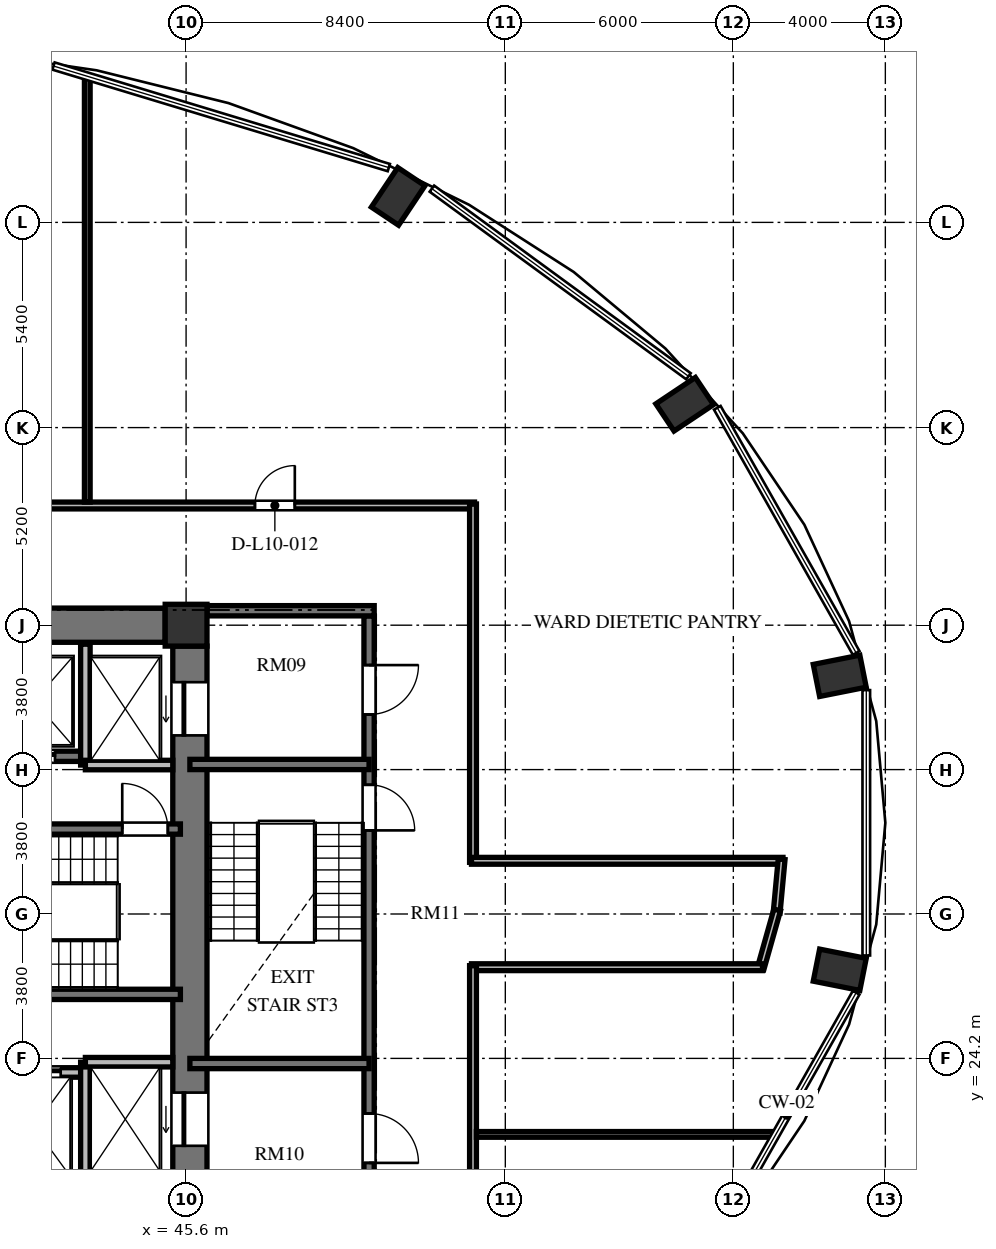
"""IFC4 building model, lengths in metres.
Left out: names, types, materials, properties, quantities, classifications, styles, units other than length and angle.
Written with IfcOpenShell. Run it as: python <this file> out.ifc"""

import sys

from ifc_helpers import new_model, si_unit, direction, frame, frame_2d, origin, origin_2d, place, context, subcontext, project, spatial, rectangle, extrude, element, fill, save


model = new_model("IFC4")
c1 = context("Model", 3, precision=1e-05, world=origin(), true_north=direction((0.0, 1.0)))
c2 = subcontext(c1, "Body", "Model", "MODEL_VIEW")
j1 = project(units=[si_unit("LENGTHUNIT", "METRE"), si_unit("PLANEANGLEUNIT", "RADIAN")], contexts=[c1])
p1 = place(None, origin())
s1 = spatial("IfcSite", under=j1, at=p1, CompositionType="ELEMENT")
p2 = place(p1, origin())
s2 = spatial("IfcBuilding", under=s1, at=p2, CompositionType="ELEMENT")
p3 = place(p2, frame((0.0, 0.0, 43.44)))
s3 = spatial("IfcBuildingStorey", under=s2, at=p3, CompositionType="ELEMENT", Elevation=43.44)
for number, where, z_axis, x_axis in (
    (1, (62.8, 26.532, 0.0), (0.0, 0.0, 1.0), (0.981, -0.195, 0.0)),
    (2, (62.8, 34.268, 0.0), (0.0, 0.0, 1.0), (0.981, 0.195, 0.0)),
    (3, (58.72, 41.414, 0.0), (0.0, 0.0, 1.0), (0.831, 0.556, 0.0)),
    (4, (51.181, 46.884, 0.0), (0.0, 0.0, 1.0), (0.556, 0.831, 0.0)),
):
    element("IfcColumn", number, at=place(p3, frame(where, z_axis=z_axis, x_axis=x_axis)), inside=s3, PredefinedType="COLUMN", context=c2, shape_type="SweptSolid", body=[
        extrude(rectangle(XDim=1.25, YDim=0.86, at=origin_2d()), origin(), (0.0, 0.0, 1.0), 3.648),
    ])
p4 = place(p3, frame((45.6, 35.6, 0.0), z_axis=(0.0, 0.0, 1.0), x_axis=(1.0, 0.0, 0.0)))
e5 = element("IfcColumn", 5, at=p4, inside=s3, PredefinedType="COLUMN", context=c2, shape_type="SweptSolid", body=[
    extrude(rectangle(XDim=1.1, YDim=1.1, at=origin_2d()), origin(), (0.0, 0.0, 1.0), 3.648),
])
p5 = place(p3, frame((45.7, 20.95, 0.0), z_axis=(0.0, 0.0, 1.0), x_axis=(0.0, 1.0, 0.0)))
e6 = element("IfcWall", 6, at=p5, inside=s3, PredefinedType="SHEAR", context=c2, shape_type="SweptSolid", body=[
    extrude(rectangle(XDim=14.1, YDim=0.9, at=frame_2d((7.05, 0.0))), origin(), (0.0, 0.0, 1.0), 3.648),
])
p6 = place(p5, frame((11.75, 0.0, 0.0)))
e7 = element("IfcOpeningElement", 7, at=p6, cuts=e6, PredefinedType="OPENING", context=c2, shape_type="SweptSolid", body=[
    extrude(rectangle(XDim=1.4, YDim=2.3, at=frame_2d((0.7, 1.15))), frame((0.0, 0.46, 0.0), z_axis=(0.0, -1.0, 0.0), x_axis=(1.0, 0.0, 0.0)), (0.0, 0.0, 1.0), 0.92),
])
p7 = place(p5, frame((0.95, 0.0, 0.0)))
e8 = element("IfcOpeningElement", 8, at=p7, cuts=e6, PredefinedType="OPENING", context=c2, shape_type="SweptSolid", body=[
    extrude(rectangle(XDim=1.4, YDim=2.3, at=frame_2d((0.7, 1.15))), frame((0.0, 0.46, 0.0), z_axis=(0.0, -1.0, 0.0), x_axis=(1.0, 0.0, 0.0)), (0.0, 0.0, 1.0), 0.92),
])
p8 = place(p3, frame((39.75, 35.6, 0.0), z_axis=(0.0, 0.0, 1.0), x_axis=(1.0, 0.0, 0.0)))
e9 = element("IfcWall", 9, at=p8, inside=s3, PredefinedType="SHEAR", context=c2, shape_type="SweptSolid", body=[
    extrude(rectangle(XDim=5.3, YDim=0.9, at=frame_2d((2.65, 0.0))), origin(), (0.0, 0.0, 1.0), 3.648),
])
p9 = place(p3, frame((37.465, 30.235, 0.0), z_axis=(0.0, 0.0, 1.0), x_axis=(1.0, 0.0, 0.0)))
e10 = element("IfcWall", 10, at=p9, inside=s3, PredefinedType="SHEAR", context=c2, shape_type="SweptSolid", body=[
    extrude(rectangle(XDim=7.985, YDim=0.27, at=frame_2d((3.992, 0.0))), origin(), (0.0, 0.0, 1.0), 3.648),
])
p10 = place(p9, frame((6.455, 0.0, 0.0)))
e11 = element("IfcOpeningElement", 11, at=p10, cuts=e10, PredefinedType="OPENING", context=c2, shape_type="SweptSolid", body=[
    extrude(rectangle(XDim=1.2, YDim=2.15, at=frame_2d((0.6, 1.075))), frame((0.0, 0.145, 0.0), z_axis=(0.0, -1.0, 0.0), x_axis=(1.0, 0.0, 0.0)), (0.0, 0.0, 1.0), 0.29),
])
p11 = place(p3, frame((37.465, 25.885, 0.0), z_axis=(0.0, 0.0, 1.0), x_axis=(1.0, 0.0, 0.0)))
e12 = element("IfcWall", 12, at=p11, inside=s3, PredefinedType="SHEAR", context=c2, shape_type="SweptSolid", body=[
    extrude(rectangle(XDim=7.985, YDim=0.27, at=frame_2d((3.992, 0.0))), origin(), (0.0, 0.0, 1.0), 3.648),
])
p12 = place(p3, frame((26.55, 32.15, 0.0), z_axis=(0.0, 0.0, 1.0), x_axis=(1.0, 0.0, 0.0)))
e13 = element("IfcWall", 13, at=p12, inside=s3, PredefinedType="SHEAR", context=c2, shape_type="SweptSolid", body=[
    extrude(rectangle(XDim=16.4, YDim=0.27, at=frame_2d((8.2, 0.0))), origin(), (0.0, 0.0, 1.0), 3.648),
])
p13 = place(p12, frame((1.1, 0.0, 0.0)))
e14 = element("IfcOpeningElement", 14, at=p13, cuts=e13, PredefinedType="OPENING", context=c2, shape_type="SweptSolid", body=[
    extrude(rectangle(XDim=1.1, YDim=2.2, at=frame_2d((0.55, 1.1))), frame((0.0, 0.145, 0.0), z_axis=(0.0, -1.0, 0.0), x_axis=(1.0, 0.0, 0.0)), (0.0, 0.0, 1.0), 0.29),
])
p14 = place(p12, frame((3.7, 0.0, 0.0)))
e15 = element("IfcOpeningElement", 15, at=p14, cuts=e13, PredefinedType="OPENING", context=c2, shape_type="SweptSolid", body=[
    extrude(rectangle(XDim=1.1, YDim=2.2, at=frame_2d((0.55, 1.1))), frame((0.0, 0.145, 0.0), z_axis=(0.0, -1.0, 0.0), x_axis=(1.0, 0.0, 0.0)), (0.0, 0.0, 1.0), 0.29),
])
p15 = place(p12, frame((6.5, 0.0, 0.0)))
e16 = element("IfcOpeningElement", 16, at=p15, cuts=e13, PredefinedType="OPENING", context=c2, shape_type="SweptSolid", body=[
    extrude(rectangle(XDim=1.1, YDim=2.2, at=frame_2d((0.55, 1.1))), frame((0.0, 0.145, 0.0), z_axis=(0.0, -1.0, 0.0), x_axis=(1.0, 0.0, 0.0)), (0.0, 0.0, 1.0), 0.29),
])
p16 = place(p12, frame((9.1, 0.0, 0.0)))
e17 = element("IfcOpeningElement", 17, at=p16, cuts=e13, PredefinedType="OPENING", context=c2, shape_type="SweptSolid", body=[
    extrude(rectangle(XDim=1.1, YDim=2.2, at=frame_2d((0.55, 1.1))), frame((0.0, 0.145, 0.0), z_axis=(0.0, -1.0, 0.0), x_axis=(1.0, 0.0, 0.0)), (0.0, 0.0, 1.0), 0.29),
])
p17 = place(p12, frame((11.9, 0.0, 0.0)))
e18 = element("IfcOpeningElement", 18, at=p17, cuts=e13, PredefinedType="OPENING", context=c2, shape_type="SweptSolid", body=[
    extrude(rectangle(XDim=1.1, YDim=2.2, at=frame_2d((0.55, 1.1))), frame((0.0, 0.145, 0.0), z_axis=(0.0, -1.0, 0.0), x_axis=(1.0, 0.0, 0.0)), (0.0, 0.0, 1.0), 0.29),
])
p18 = place(p12, frame((14.5, 0.0, 0.0)))
e19 = element("IfcOpeningElement", 19, at=p18, cuts=e13, PredefinedType="OPENING", context=c2, shape_type="SweptSolid", body=[
    extrude(rectangle(XDim=1.1, YDim=2.2, at=frame_2d((0.55, 1.1))), frame((0.0, 0.145, 0.0), z_axis=(0.0, -1.0, 0.0), x_axis=(1.0, 0.0, 0.0)), (0.0, 0.0, 1.0), 0.29),
])
p19 = place(p3, frame((26.75, 23.83, 0.0), z_axis=(0.0, 0.0, 1.0), x_axis=(1.0, 0.0, 0.0)))
e20 = element("IfcWall", 20, at=p19, inside=s3, PredefinedType="SOLIDWALL", context=c2, shape_type="SweptSolid", body=[
    extrude(rectangle(XDim=16.2, YDim=0.25, at=frame_2d((8.1, 0.0))), origin(), (0.0, 0.0, 1.0), 3.428),
])
p20 = place(p19, frame((0.9, 0.0, 0.0)))
e21 = element("IfcOpeningElement", 21, at=p20, cuts=e20, PredefinedType="OPENING", context=c2, shape_type="SweptSolid", body=[
    extrude(rectangle(XDim=1.1, YDim=2.2, at=frame_2d((0.55, 1.1))), frame((0.0, 0.135, 0.0), z_axis=(0.0, -1.0, 0.0), x_axis=(1.0, 0.0, 0.0)), (0.0, 0.0, 1.0), 0.27),
])
p21 = place(p19, frame((3.5, 0.0, 0.0)))
e22 = element("IfcOpeningElement", 22, at=p21, cuts=e20, PredefinedType="OPENING", context=c2, shape_type="SweptSolid", body=[
    extrude(rectangle(XDim=1.1, YDim=2.2, at=frame_2d((0.55, 1.1))), frame((0.0, 0.135, 0.0), z_axis=(0.0, -1.0, 0.0), x_axis=(1.0, 0.0, 0.0)), (0.0, 0.0, 1.0), 0.27),
])
p22 = place(p19, frame((6.3, 0.0, 0.0)))
e23 = element("IfcOpeningElement", 23, at=p22, cuts=e20, PredefinedType="OPENING", context=c2, shape_type="SweptSolid", body=[
    extrude(rectangle(XDim=1.1, YDim=2.2, at=frame_2d((0.55, 1.1))), frame((0.0, 0.135, 0.0), z_axis=(0.0, -1.0, 0.0), x_axis=(1.0, 0.0, 0.0)), (0.0, 0.0, 1.0), 0.27),
])
p23 = place(p19, frame((8.9, 0.0, 0.0)))
e24 = element("IfcOpeningElement", 24, at=p23, cuts=e20, PredefinedType="OPENING", context=c2, shape_type="SweptSolid", body=[
    extrude(rectangle(XDim=1.1, YDim=2.2, at=frame_2d((0.55, 1.1))), frame((0.0, 0.135, 0.0), z_axis=(0.0, -1.0, 0.0), x_axis=(1.0, 0.0, 0.0)), (0.0, 0.0, 1.0), 0.27),
])
p24 = place(p19, frame((11.7, 0.0, 0.0)))
e25 = element("IfcOpeningElement", 25, at=p24, cuts=e20, PredefinedType="OPENING", context=c2, shape_type="SweptSolid", body=[
    extrude(rectangle(XDim=1.1, YDim=2.2, at=frame_2d((0.55, 1.1))), frame((0.0, 0.135, 0.0), z_axis=(0.0, -1.0, 0.0), x_axis=(1.0, 0.0, 0.0)), (0.0, 0.0, 1.0), 0.27),
])
p25 = place(p19, frame((14.15, 0.0, 0.0)))
e26 = element("IfcOpeningElement", 26, at=p25, cuts=e20, PredefinedType="OPENING", context=c2, shape_type="SweptSolid", body=[
    extrude(rectangle(XDim=1.4, YDim=2.3, at=frame_2d((0.7, 1.15))), frame((0.0, 0.135, 0.0), z_axis=(0.0, -1.0, 0.0), x_axis=(1.0, 0.0, 0.0)), (0.0, 0.0, 1.0), 0.27),
])
p26 = place(p3, frame((42.95, 31.92, 0.0), z_axis=(0.0, 0.0, 1.0), x_axis=(0.0, 1.0, 0.0)))
e27 = element("IfcWall", 27, at=p26, inside=s3, PredefinedType="SOLIDWALL", context=c2, shape_type="SweptSolid", body=[
    extrude(rectangle(XDim=3.18, YDim=0.25, at=frame_2d((1.59, 0.0))), origin(), (0.0, 0.0, 1.0), 3.428),
])
p27 = place(p3, frame((42.95, 31.92, 0.0), z_axis=(0.0, 0.0, 1.0), x_axis=(1.0, 0.0, 0.0)))
e28 = element("IfcWall", 28, at=p27, inside=s3, PredefinedType="SOLIDWALL", context=c2, shape_type="SweptSolid", body=[
    extrude(rectangle(XDim=2.3, YDim=0.25, at=frame_2d((1.15, 0.0))), origin(), (0.0, 0.0, 1.0), 3.428),
])
p28 = place(p3, frame((42.95, 20.9, 0.0), z_axis=(0.0, 0.0, 1.0), x_axis=(0.0, 1.0, 0.0)))
e29 = element("IfcWall", 29, at=p28, inside=s3, PredefinedType="SOLIDWALL", context=c2, shape_type="SweptSolid", body=[
    extrude(rectangle(XDim=3.2, YDim=0.25, at=frame_2d((1.6, 0.0))), origin(), (0.0, 0.0, 1.0), 3.428),
])
p29 = place(p3, frame((42.95, 24.1, 0.0), z_axis=(0.0, 0.0, 1.0), x_axis=(1.0, 0.0, 0.0)))
e30 = element("IfcWall", 30, at=p29, inside=s3, PredefinedType="SOLIDWALL", context=c2, shape_type="SweptSolid", body=[
    extrude(rectangle(XDim=2.3, YDim=0.25, at=frame_2d((1.15, 0.0))), origin(), (0.0, 0.0, 1.0), 3.428),
])
p30 = place(p3, frame((50.415, 35.845, 0.0), z_axis=(0.0, 0.0, 1.0), x_axis=(0.0, -1.0, 0.0)))
e31 = element("IfcWall", 31, at=p30, inside=s3, PredefinedType="SHEAR", context=c2, shape_type="SweptSolid", body=[
    extrude(rectangle(XDim=15.825, YDim=0.27, at=frame_2d((7.913, 0.0))), origin(), (0.0, 0.0, 1.0), 3.648),
])
p31 = place(p30, frame((4.445, 0.0, 0.0)))
e32 = element("IfcOpeningElement", 32, at=p31, cuts=e31, PredefinedType="OPENING", context=c2, shape_type="SweptSolid", body=[
    extrude(rectangle(XDim=1.2, YDim=2.15, at=frame_2d((0.6, 1.075))), frame((0.0, 0.145, 0.0), z_axis=(0.0, -1.0, 0.0), x_axis=(1.0, 0.0, 0.0)), (0.0, 0.0, 1.0), 0.29),
])
p32 = place(p30, frame((1.295, 0.0, 0.0)))
e33 = element("IfcOpeningElement", 33, at=p32, cuts=e31, PredefinedType="OPENING", context=c2, shape_type="SweptSolid", body=[
    extrude(rectangle(XDim=1.3, YDim=2.2, at=frame_2d((0.65, 1.1))), frame((0.0, 0.145, 0.0), z_axis=(0.0, -1.0, 0.0), x_axis=(1.0, 0.0, 0.0)), (0.0, 0.0, 1.0), 0.29),
])
p33 = place(p30, frame((13.095, 0.0, 0.0)))
e34 = element("IfcOpeningElement", 34, at=p33, cuts=e31, PredefinedType="OPENING", context=c2, shape_type="SweptSolid", body=[
    extrude(rectangle(XDim=1.3, YDim=2.2, at=frame_2d((0.65, 1.1))), frame((0.0, 0.145, 0.0), z_axis=(0.0, -1.0, 0.0), x_axis=(1.0, 0.0, 0.0)), (0.0, 0.0, 1.0), 0.29),
])
p34 = place(p3, frame((46.15, 35.98, 0.0), z_axis=(0.0, 0.0, 1.0), x_axis=(1.0, 0.0, 0.0)))
e35 = element("IfcWall", 35, at=p34, inside=s3, PredefinedType="SHEAR", context=c2, shape_type="SweptSolid", body=[
    extrude(rectangle(XDim=4.4, YDim=0.27, at=frame_2d((2.2, 0.0))), origin(), (0.0, 0.0, 1.0), 3.648),
])
for number, where, z_axis, x_axis in (
    (36, (45.7, 31.935, 0.0), (0.0, 0.0, 1.0), (1.0, 0.0, 0.0)),
    (37, (45.7, 24.065, 0.0), (0.0, 0.0, 1.0), (1.0, 0.0, 0.0)),
):
    element("IfcWall", number, at=place(p3, frame(where, z_axis=z_axis, x_axis=x_axis)), inside=s3, PredefinedType="SHEAR", context=c2, shape_type="SweptSolid", body=[
        extrude(rectangle(XDim=4.715, YDim=0.27, at=frame_2d((2.357, 0.0))), origin(), (0.0, 0.0, 1.0), 3.648),
    ])
p35 = place(p3, frame((23.31, 38.75, 0.0), z_axis=(0.0, 0.0, 1.0), x_axis=(1.0, 0.0, 0.0)))
e38 = element("IfcWall", 38, at=p35, inside=s3, PredefinedType="PARTITIONING", context=c2, shape_type="SweptSolid", body=[
    extrude(rectangle(XDim=29.88, YDim=0.18, at=frame_2d((14.94, 0.0))), origin(), (0.0, 0.0, 1.0), 3.053),
])
p36 = place(p35, frame((24.101, 0.0, 0.0)))
e39 = element("IfcOpeningElement", 39, at=p36, cuts=e38, PredefinedType="OPENING", context=c2, shape_type="SweptSolid", body=[
    extrude(rectangle(XDim=1.05, YDim=2.15, at=frame_2d((0.525, 1.075))), frame((0.0, 0.1, 0.0), z_axis=(0.0, -1.0, 0.0), x_axis=(1.0, 0.0, 0.0)), (0.0, 0.0, 1.0), 0.2),
])
p37 = place(p35, frame((13.165, 0.0, 0.0)))
e40 = element("IfcOpeningElement", 40, at=p37, cuts=e38, PredefinedType="OPENING", context=c2, shape_type="SweptSolid", body=[
    extrude(rectangle(XDim=1.05, YDim=2.15, at=frame_2d((0.525, 1.075))), frame((0.0, 0.1, 0.0), z_axis=(0.0, -1.0, 0.0), x_axis=(1.0, 0.0, 0.0)), (0.0, 0.0, 1.0), 0.2),
])
p38 = place(p35, frame((4.479, 0.0, 0.0)))
e41 = element("IfcOpeningElement", 41, at=p38, cuts=e38, PredefinedType="OPENING", context=c2, shape_type="SweptSolid", body=[
    extrude(rectangle(XDim=1.05, YDim=2.15, at=frame_2d((0.525, 1.075))), frame((0.0, 0.1, 0.0), z_axis=(0.0, -1.0, 0.0), x_axis=(1.0, 0.0, 0.0)), (0.0, 0.0, 1.0), 0.2),
])
p39 = place(p3, frame((53.15, 38.79, 0.0), z_axis=(0.0, 0.0, 1.0), x_axis=(0.0, -1.0, 0.0)))
e42 = element("IfcWall", 42, at=p39, inside=s3, PredefinedType="PARTITIONING", context=c2, shape_type="SweptSolid", body=[
    extrude(rectangle(XDim=9.43, YDim=0.18, at=frame_2d((4.715, 0.0))), origin(), (0.0, 0.0, 1.0), 3.428),
])
p40 = place(p3, frame((53.11, 29.4, 0.0), z_axis=(0.0, 0.0, 1.0), x_axis=(1.0, 0.0, 0.0)))
e43 = element("IfcWall", 43, at=p40, inside=s3, PredefinedType="PARTITIONING", context=c2, shape_type="SweptSolid", body=[
    extrude(rectangle(XDim=8.197, YDim=0.18, at=frame_2d((4.098, 0.0))), origin(), (0.0, 0.0, 1.0), 3.428),
])
p41 = place(p3, frame((61.271, 29.44, 0.0), z_axis=(0.0, 0.0, 1.0), x_axis=(-0.092539930621, -0.995708974169, 0.0)))
e44 = element("IfcWall", 44, at=p41, inside=s3, PredefinedType="PARTITIONING", context=c2, shape_type="SweptSolid", body=[
    extrude(rectangle(XDim=1.417, YDim=0.18, at=frame_2d((0.708, 0.0))), origin(), (0.0, 0.0, 1.0), 3.428),
])
p42 = place(p3, frame((61.154, 28.107, 0.0), z_axis=(0.0, 0.0, 1.0), x_axis=(-0.271748942561, -0.962368179138, 0.0)))
e45 = element("IfcWall", 45, at=p42, inside=s3, PredefinedType="PARTITIONING", context=c2, shape_type="SweptSolid", body=[
    extrude(rectangle(XDim=1.606, YDim=0.18, at=frame_2d((0.803, 0.0))), origin(), (0.0, 0.0, 1.0), 3.428),
])
p43 = place(p3, frame((60.768, 26.6, 0.0), z_axis=(0.0, 0.0, 1.0), x_axis=(-1.0, 0.0, 0.0)))
e46 = element("IfcWall", 46, at=p43, inside=s3, PredefinedType="PARTITIONING", context=c2, shape_type="SweptSolid", body=[
    extrude(rectangle(XDim=7.658, YDim=0.18, at=frame_2d((3.829, 0.0))), origin(), (0.0, 0.0, 1.0), 3.428),
])
p44 = place(p3, frame((53.15, 26.64, 0.0), z_axis=(0.0, 0.0, 1.0), x_axis=(0.0, -1.0, 0.0)))
e47 = element("IfcWall", 47, at=p44, inside=s3, PredefinedType="PARTITIONING", context=c2, shape_type="SweptSolid", body=[
    extrude(rectangle(XDim=6.66, YDim=0.18, at=frame_2d((3.33, 0.0))), origin(), (0.0, 0.0, 1.0), 3.428),
])
p45 = place(p3, frame((53.24, 22.2, 0.0), z_axis=(0.0, 0.0, 1.0), x_axis=(1.0, 0.0, 0.0)))
e48 = element("IfcWall", 48, at=p45, inside=s3, PredefinedType="PARTITIONING", context=c2, shape_type="SweptSolid", body=[
    extrude(rectangle(XDim=7.875, YDim=0.15, at=frame_2d((3.938, 0.0))), origin(), (0.0, 0.0, 1.0), 3.428),
])
p46 = place(p3, frame((43.0, 38.84, 0.0), z_axis=(0.0, 0.0, 1.0), x_axis=(0.0, 1.0, 0.0)))
e49 = element("IfcWall", 49, at=p46, inside=s3, PredefinedType="PARTITIONING", context=c2, shape_type="SweptSolid", body=[
    extrude(rectangle(XDim=11.193, YDim=0.15, at=frame_2d((5.597, 0.0))), origin(), (0.0, 0.0, 1.0), 3.428),
])
p47 = place(p10, origin())
e50 = element("IfcDoor", 50, at=p47, inside=s3, OperationType="SINGLE_SWING_LEFT", PredefinedType="DOOR", context=c2, shape_type="SweptSolid", body=[
    extrude(rectangle(XDim=1.2, YDim=2.15, at=frame_2d((0.6, 1.075))), frame((0.0, 0.025, 0.0), z_axis=(0.0, -1.0, 0.0), x_axis=(1.0, 0.0, 0.0)), (0.0, 0.0, 1.0), 0.05),
])
fill(e11, e50)
p48 = place(p18, origin())
e51 = element("IfcDoor", 51, at=p48, inside=s3, OperationType="SLIDING_TO_LEFT", PredefinedType="DOOR", context=c2, shape_type="SweptSolid", body=[
    extrude(rectangle(XDim=1.1, YDim=2.2, at=frame_2d((0.55, 1.1))), frame((0.0, 0.025, 0.0), z_axis=(0.0, -1.0, 0.0), x_axis=(1.0, 0.0, 0.0)), (0.0, 0.0, 1.0), 0.05),
])
fill(e19, e51)
p49 = place(p6, origin())
e52 = element("IfcDoor", 52, at=p49, inside=s3, OperationType="SLIDING_TO_LEFT", PredefinedType="DOOR", context=c2, shape_type="SweptSolid", body=[
    extrude(rectangle(XDim=1.4, YDim=2.3, at=frame_2d((0.7, 1.15))), frame((0.0, 0.025, 0.0), z_axis=(0.0, -1.0, 0.0), x_axis=(1.0, 0.0, 0.0)), (0.0, 0.0, 1.0), 0.05),
])
fill(e7, e52)
p50 = place(p7, origin())
e53 = element("IfcDoor", 53, at=p50, inside=s3, OperationType="SLIDING_TO_LEFT", PredefinedType="DOOR", context=c2, shape_type="SweptSolid", body=[
    extrude(rectangle(XDim=1.4, YDim=2.3, at=frame_2d((0.7, 1.15))), frame((0.0, 0.025, 0.0), z_axis=(0.0, -1.0, 0.0), x_axis=(1.0, 0.0, 0.0)), (0.0, 0.0, 1.0), 0.05),
])
fill(e8, e53)
p51 = place(p25, origin())
e54 = element("IfcDoor", 54, at=p51, inside=s3, OperationType="SLIDING_TO_LEFT", PredefinedType="DOOR", context=c2, shape_type="SweptSolid", body=[
    extrude(rectangle(XDim=1.4, YDim=2.3, at=frame_2d((0.7, 1.15))), frame((0.0, 0.025, 0.0), z_axis=(0.0, -1.0, 0.0), x_axis=(1.0, 0.0, 0.0)), (0.0, 0.0, 1.0), 0.05),
])
fill(e26, e54)
p52 = place(p31, origin())
e55 = element("IfcDoor", 55, at=p52, inside=s3, OperationType="SINGLE_SWING_RIGHT", PredefinedType="DOOR", context=c2, shape_type="SweptSolid", body=[
    extrude(rectangle(XDim=1.2, YDim=2.15, at=frame_2d((0.6, 1.075))), frame((0.0, 0.025, 0.0), z_axis=(0.0, -1.0, 0.0), x_axis=(1.0, 0.0, 0.0)), (0.0, 0.0, 1.0), 0.05),
])
fill(e32, e55)
p53 = place(p32, origin())
e56 = element("IfcDoor", 56, at=p53, inside=s3, OperationType="SINGLE_SWING_LEFT", PredefinedType="DOOR", context=c2, shape_type="SweptSolid", body=[
    extrude(rectangle(XDim=1.3, YDim=2.2, at=frame_2d((0.65, 1.1))), frame((0.0, 0.025, 0.0), z_axis=(0.0, -1.0, 0.0), x_axis=(1.0, 0.0, 0.0)), (0.0, 0.0, 1.0), 0.05),
])
fill(e33, e56)
p54 = place(p33, origin())
e57 = element("IfcDoor", 57, at=p54, inside=s3, OperationType="SINGLE_SWING_RIGHT", PredefinedType="DOOR", context=c2, shape_type="SweptSolid", body=[
    extrude(rectangle(XDim=1.3, YDim=2.2, at=frame_2d((0.65, 1.1))), frame((0.0, 0.025, 0.0), z_axis=(0.0, -1.0, 0.0), x_axis=(1.0, 0.0, 0.0)), (0.0, 0.0, 1.0), 0.05),
])
fill(e34, e57)
p55 = place(p36, origin())
e58 = element("IfcDoor", 58, at=p55, inside=s3, OperationType="SINGLE_SWING_RIGHT", PredefinedType="DOOR", context=c2, shape_type="SweptSolid", body=[
    extrude(rectangle(XDim=1.05, YDim=2.15, at=frame_2d((0.525, 1.075))), frame((0.0, 0.025, 0.0), z_axis=(0.0, -1.0, 0.0), x_axis=(1.0, 0.0, 0.0)), (0.0, 0.0, 1.0), 0.05),
])
fill(e39, e58)
save(model, sys.argv[1])
